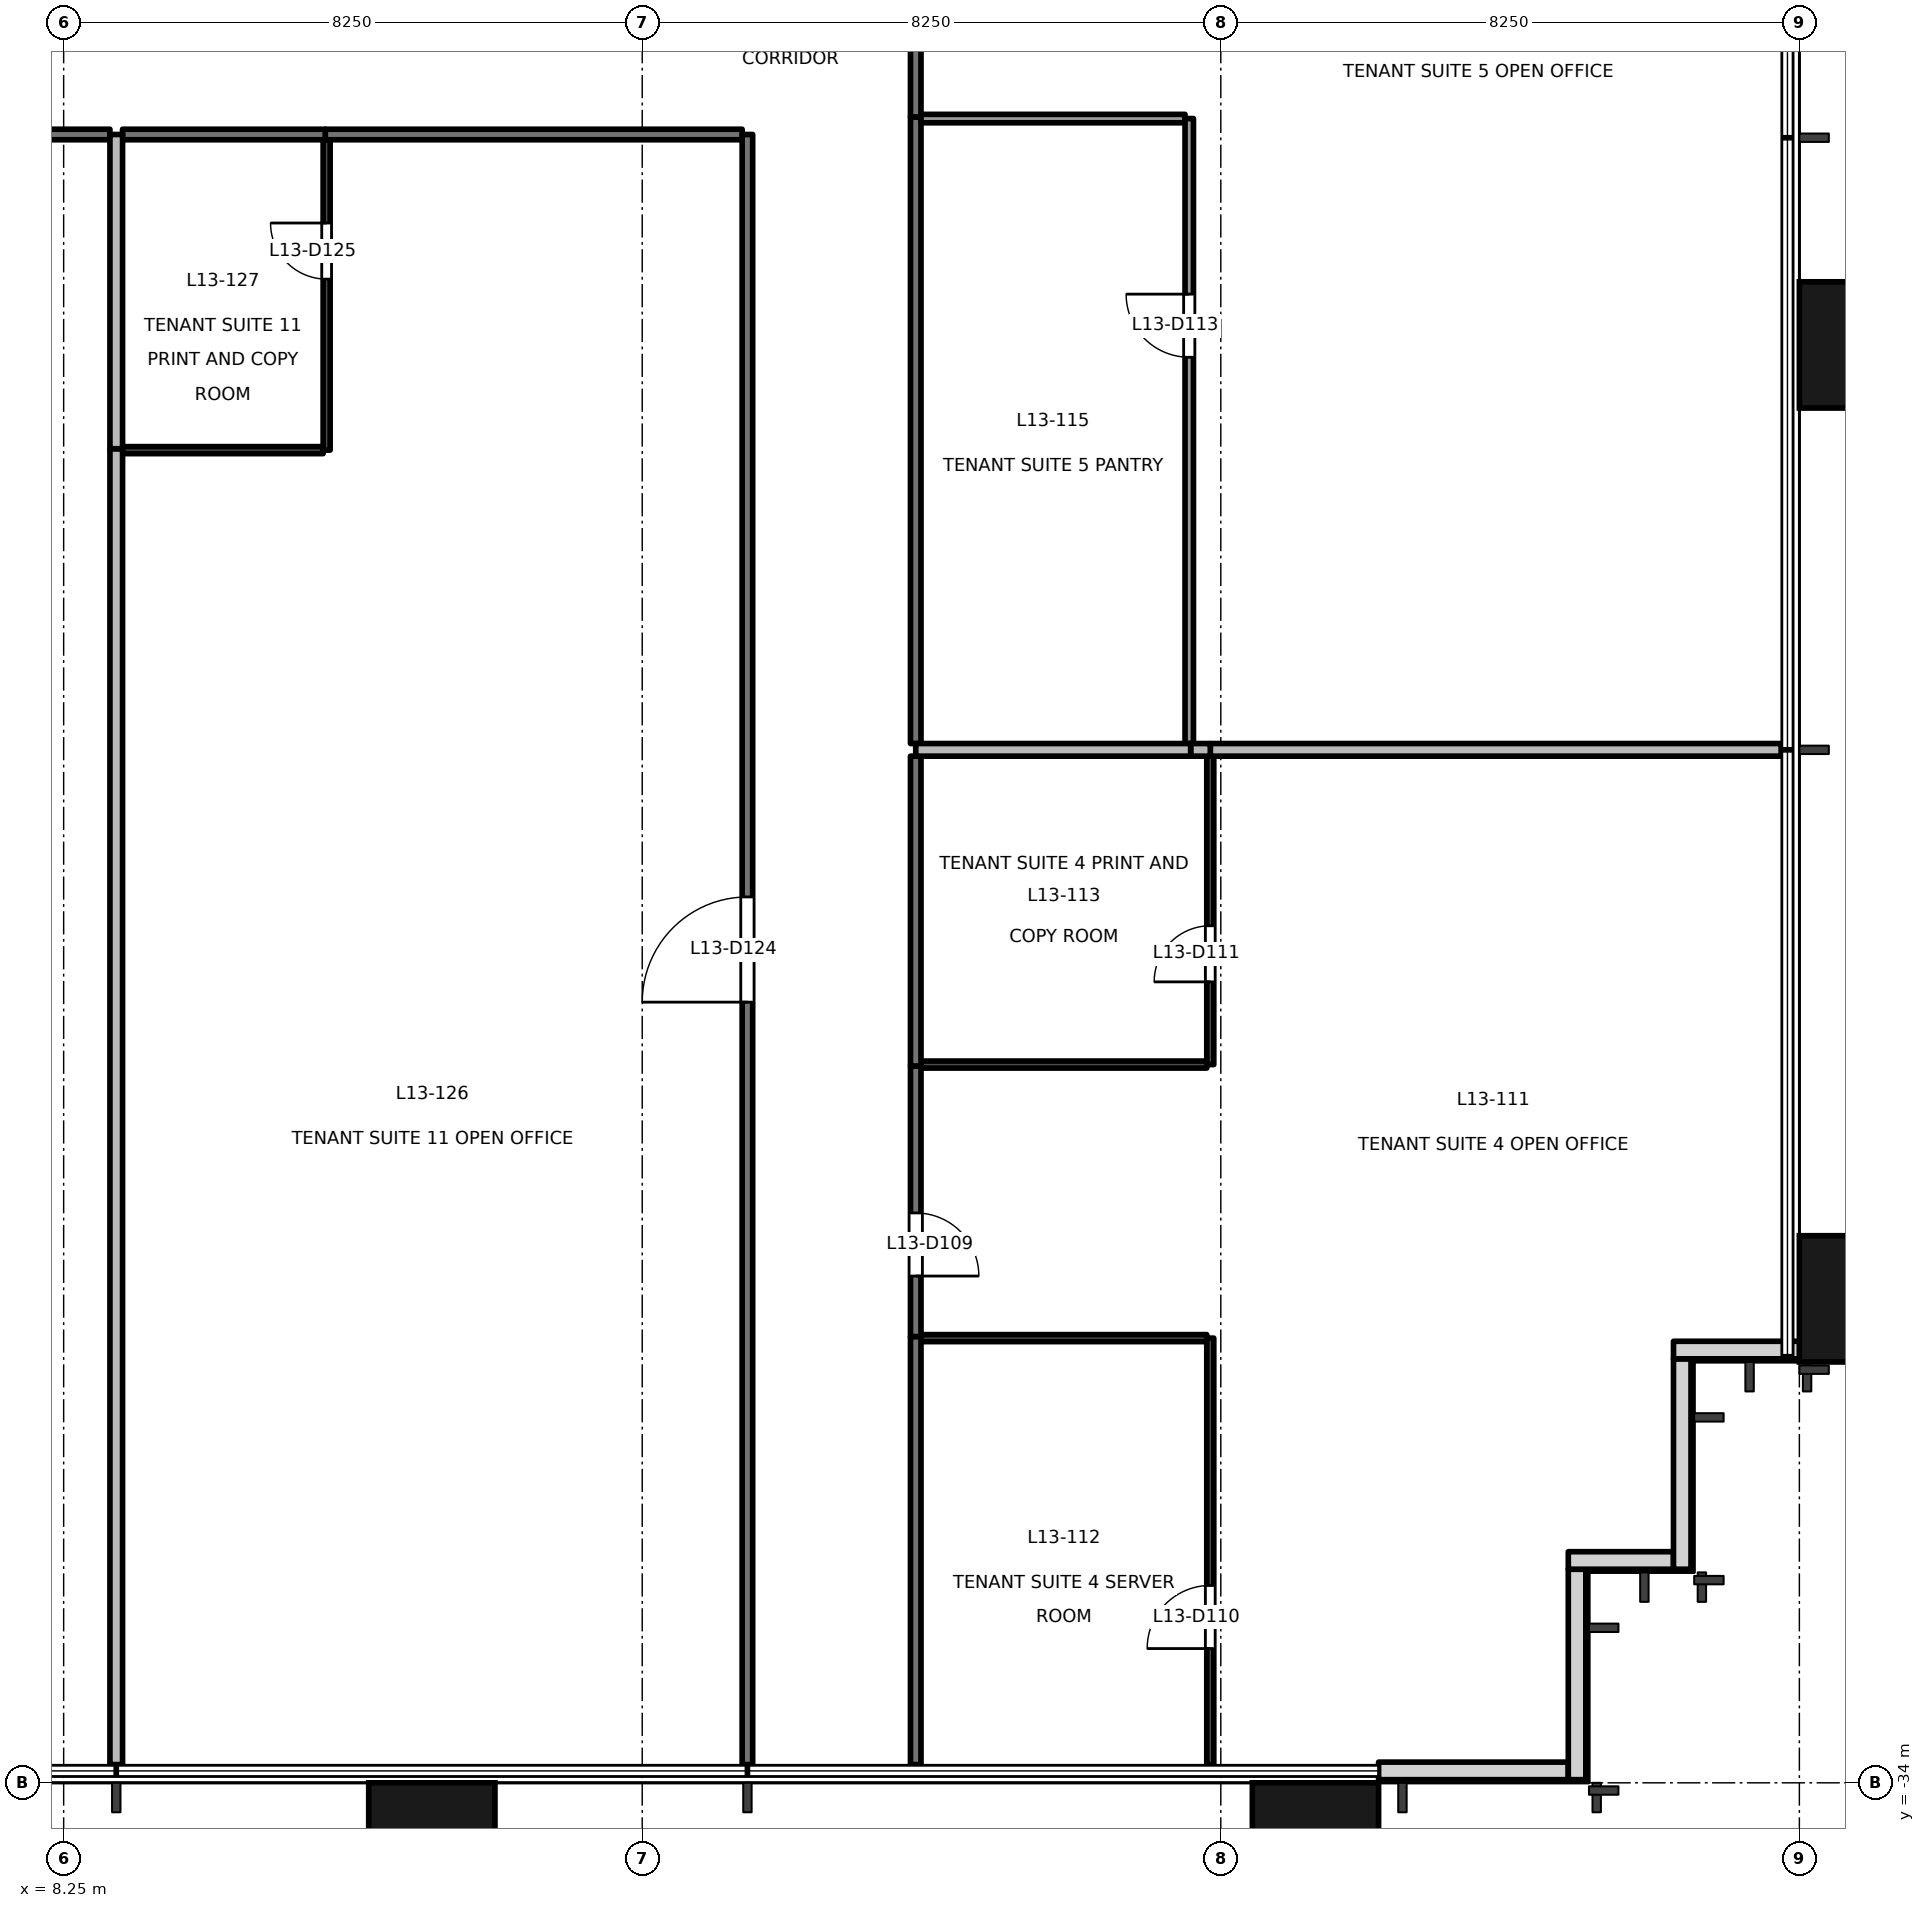
"""IFC4 building model, lengths in metres.
Left out: names, types, materials, properties, quantities, classifications, styles, units other than length and angle.
Written with IfcOpenShell. Run it as: python <this file> out.ifc"""

import sys

from ifc_helpers import new_model, si_unit, direction, frame, frame_2d, origin, origin_2d, place, context, subcontext, project, spatial, rectangle, extrude, element, fill, save


model = new_model("IFC4")
c1 = context("Model", 3, precision=1e-05, world=origin(), true_north=direction((0.0, 1.0)))
c2 = subcontext(c1, "Body", "Model", "MODEL_VIEW")
j1 = project(units=[si_unit("LENGTHUNIT", "METRE"), si_unit("PLANEANGLEUNIT", "RADIAN")], contexts=[c1])
p1 = place(None, origin())
s1 = spatial("IfcSite", under=j1, at=p1, CompositionType="ELEMENT")
p2 = place(p1, origin())
s2 = spatial("IfcBuilding", under=s1, at=p2, CompositionType="ELEMENT")
p3 = place(p2, frame((0.0, 0.0, 61.1)))
s3 = spatial("IfcBuildingStorey", under=s2, at=p3, CompositionType="ELEMENT", Elevation=61.1)
for number, where, z_axis, x_axis in (
    (1, (13.5, -34.9, -0.2), (0.0, 0.0, 1.0), (1.0, 0.0, 0.0)),
    (2, (26.1, -34.9, -0.2), (0.0, 0.0, 1.0), (1.0, 0.0, 0.0)),
    (3, (33.9, -27.1, -0.2), (0.0, 0.0, 1.0), (0.0, 1.0, 0.0)),
    (4, (33.9, -13.5, -0.2), (0.0, 0.0, 1.0), (0.0, 1.0, 0.0)),
):
    element("IfcColumn", number, at=place(p3, frame(where, z_axis=z_axis, x_axis=x_axis)), inside=s3, PredefinedType="COLUMN", context=c2, shape_type="SweptSolid", body=[
        extrude(rectangle(XDim=1.8, YDim=1.8, at=origin_2d()), origin(), (0.0, 0.0, 1.0), 4.1),
    ])
p4 = place(p3, frame((27.0, -33.83, 0.0), z_axis=(0.0, 0.0, 1.0), x_axis=(1.0, 0.0, 0.0)))
e5 = element("IfcWall", 5, at=p4, inside=s3, PredefinedType="SOLIDWALL", context=c2, shape_type="SweptSolid", body=[
    extrude(rectangle(XDim=2.705, YDim=0.25, at=frame_2d((1.353, 0.0))), origin(), (0.0, 0.0, 1.0), 3.9),
])
p5 = place(p3, frame((29.83, -33.955, 0.0), z_axis=(0.0, 0.0, 1.0), x_axis=(0.0, 1.0, 0.0)))
e6 = element("IfcWall", 6, at=p5, inside=s3, PredefinedType="SOLIDWALL", context=c2, shape_type="SweptSolid", body=[
    extrude(rectangle(XDim=3.0, YDim=0.25, at=frame_2d((1.5, 0.0))), origin(), (0.0, 0.0, 1.0), 3.9),
])
p6 = place(p3, frame((29.705, -30.83, 0.0), z_axis=(0.0, 0.0, 1.0), x_axis=(1.0, 0.0, 0.0)))
e7 = element("IfcWall", 7, at=p6, inside=s3, PredefinedType="SOLIDWALL", context=c2, shape_type="SweptSolid", body=[
    extrude(rectangle(XDim=1.5, YDim=0.25, at=frame_2d((0.75, 0.0))), origin(), (0.0, 0.0, 1.0), 3.9),
])
p7 = place(p3, frame((31.33, -30.955, 0.0), z_axis=(0.0, 0.0, 1.0), x_axis=(0.0, 1.0, 0.0)))
e8 = element("IfcWall", 8, at=p7, inside=s3, PredefinedType="SOLIDWALL", context=c2, shape_type="SweptSolid", body=[
    extrude(rectangle(XDim=3.0, YDim=0.25, at=frame_2d((1.5, 0.0))), origin(), (0.0, 0.0, 1.0), 3.9),
])
p8 = place(p3, frame((31.205, -27.83, 0.0), z_axis=(0.0, 0.0, 1.0), x_axis=(1.0, 0.0, 0.0)))
e9 = element("IfcWall", 9, at=p8, inside=s3, PredefinedType="SOLIDWALL", context=c2, shape_type="SweptSolid", body=[
    extrude(rectangle(XDim=1.8, YDim=0.25, at=frame_2d((0.9, 0.0))), origin(), (0.0, 0.0, 1.0), 3.9),
])
p9 = place(p3, frame((20.4, -23.78, 0.0), z_axis=(0.0, 0.0, 1.0), x_axis=(0.0, -1.0, 0.0)))
e10 = element("IfcWall", 10, at=p9, inside=s3, PredefinedType="PARTITIONING", context=c2, shape_type="SweptSolid", body=[
    extrude(rectangle(XDim=3.86, YDim=0.15, at=frame_2d((1.93, 0.0))), origin(), (0.0, 0.0, 1.0), 3.3),
])
p10 = place(p9, frame((2.095, 0.0, 0.0)))
e11 = element("IfcOpeningElement", 11, at=p10, cuts=e10, PredefinedType="OPENING", context=c2, shape_type="SweptSolid", body=[
    extrude(rectangle(XDim=0.9, YDim=2.1, at=frame_2d((0.45, 1.05))), frame((0.0, 0.085, 0.0), z_axis=(0.0, -1.0, 0.0), x_axis=(1.0, 0.0, 0.0)), (0.0, 0.0, 1.0), 0.171),
])
p11 = place(p3, frame((20.4, -27.64, 0.0), z_axis=(0.0, 0.0, 1.0), x_axis=(0.0, -1.0, 0.0)))
e12 = element("IfcWall", 12, at=p11, inside=s3, PredefinedType="PARTITIONING", context=c2, shape_type="SweptSolid", body=[
    extrude(rectangle(XDim=6.1, YDim=0.15, at=frame_2d((3.05, 0.0))), origin(), (0.0, 0.0, 1.0), 3.9),
])
p12 = place(p3, frame((20.4, -19.363, 0.0), z_axis=(0.0, 0.0, 1.0), x_axis=(0.0, -1.0, 0.0)))
e13 = element("IfcWall", 13, at=p12, inside=s3, PredefinedType="PARTITIONING", context=c2, shape_type="SweptSolid", body=[
    extrude(rectangle(XDim=4.417, YDim=0.15, at=frame_2d((2.208, 0.0))), origin(), (0.0, 0.0, 1.0), 3.3),
])
p13 = place(p3, frame((20.4, -4.817, 0.0), z_axis=(0.0, 0.0, 1.0), x_axis=(0.0, -1.0, 0.0)))
e14 = element("IfcWall", 14, at=p13, inside=s3, PredefinedType="PARTITIONING", context=c2, shape_type="SweptSolid", body=[
    extrude(rectangle(XDim=5.436, YDim=0.15, at=frame_2d((2.718, 0.0))), origin(), (0.0, 0.0, 1.0), 3.3),
])
p14 = place(p13, frame((1.109, 0.0, 0.0)))
e15 = element("IfcOpeningElement", 15, at=p14, cuts=e14, PredefinedType="OPENING", context=c2, shape_type="SweptSolid", body=[
    extrude(rectangle(XDim=1.5, YDim=2.1, at=frame_2d((0.75, 1.05))), frame((0.0, 0.085, 0.0), z_axis=(0.0, -1.0, 0.0), x_axis=(1.0, 0.0, 0.0)), (0.0, 0.0, 1.0), 0.171),
])
p15 = place(p3, frame((20.4, -10.253, 0.0), z_axis=(0.0, 0.0, 1.0), x_axis=(0.0, -1.0, 0.0)))
e16 = element("IfcWall", 16, at=p15, inside=s3, PredefinedType="PARTITIONING", context=c2, shape_type="SweptSolid", body=[
    extrude(rectangle(XDim=8.93, YDim=0.15, at=frame_2d((4.465, 0.0))), origin(), (0.0, 0.0, 1.0), 3.3),
])
p16 = place(p3, frame((8.91, -10.5, 0.0), z_axis=(0.0, 0.0, 1.0), x_axis=(-1.0, 0.0, 0.0)))
e17 = element("IfcWall", 17, at=p16, inside=s3, PredefinedType="PARTITIONING", context=c2, shape_type="SweptSolid", body=[
    extrude(rectangle(XDim=5.93, YDim=0.15, at=frame_2d((2.965, 0.0))), origin(), (0.0, 0.0, 1.0), 2.9),
])
p17 = place(p16, frame((1.232, 0.0, 0.0)))
e18 = element("IfcOpeningElement", 18, at=p17, cuts=e17, PredefinedType="OPENING", context=c2, shape_type="SweptSolid", body=[
    extrude(rectangle(XDim=1.5, YDim=2.1, at=frame_2d((0.75, 1.05))), frame((0.0, 0.085, 0.0), z_axis=(0.0, -1.0, 0.0), x_axis=(1.0, 0.0, 0.0)), (0.0, 0.0, 1.0), 0.171),
])
p18 = place(p3, frame((17.925, -10.5, 0.0), z_axis=(0.0, 0.0, 1.0), x_axis=(-1.0, 0.0, 0.0)))
e19 = element("IfcWall", 19, at=p18, inside=s3, PredefinedType="PARTITIONING", context=c2, shape_type="SweptSolid", body=[
    extrude(rectangle(XDim=5.945, YDim=0.15, at=frame_2d((2.973, 0.0))), origin(), (0.0, 0.0, 1.0), 2.5),
])
p19 = place(p3, frame((18.0, -33.74, 0.0), z_axis=(0.0, 0.0, 1.0), x_axis=(0.0, 1.0, 0.0)))
e20 = element("IfcWall", 20, at=p19, inside=s3, PredefinedType="PARTITIONING", context=c2, shape_type="SweptSolid", body=[
    extrude(rectangle(XDim=23.24, YDim=0.15, at=frame_2d((11.62, 0.0))), origin(), (0.0, 0.0, 1.0), 2.5),
])
p20 = place(p19, frame((10.87, 0.0, 0.0)))
e21 = element("IfcOpeningElement", 21, at=p20, cuts=e20, PredefinedType="OPENING", context=c2, shape_type="SweptSolid", body=[
    extrude(rectangle(XDim=1.5, YDim=2.1, at=frame_2d((0.75, 1.05))), frame((0.0, 0.085, 0.0), z_axis=(0.0, -1.0, 0.0), x_axis=(1.0, 0.0, 0.0)), (0.0, 0.0, 1.0), 0.171),
])
p21 = place(p3, frame((11.98, -10.5, 0.0), z_axis=(0.0, 0.0, 1.0), x_axis=(-1.0, 0.0, 0.0)))
e22 = element("IfcWall", 22, at=p21, inside=s3, PredefinedType="PARTITIONING", context=c2, shape_type="SweptSolid", body=[
    extrude(rectangle(XDim=2.89, YDim=0.15, at=frame_2d((1.445, 0.0))), origin(), (0.0, 0.0, 1.0), 2.9),
])
p22 = place(p3, frame((24.55, -27.66, 0.0), z_axis=(0.0, 0.0, 1.0), x_axis=(-1.0, 0.0, 0.0)))
e23 = element("IfcWall", 23, at=p22, inside=s3, PredefinedType="PARTITIONING", context=c2, shape_type="SweptSolid", body=[
    extrude(rectangle(XDim=4.075, YDim=0.1, at=frame_2d((2.038, 0.0))), origin(), (0.0, 0.0, 1.0), 3.9),
])
p23 = place(p3, frame((24.6, -33.74, 0.0), z_axis=(0.0, 0.0, 1.0), x_axis=(0.0, 1.0, 0.0)))
e24 = element("IfcWall", 24, at=p23, inside=s3, PredefinedType="PARTITIONING", context=c2, shape_type="SweptSolid", body=[
    extrude(rectangle(XDim=6.08, YDim=0.1, at=frame_2d((3.04, 0.0))), origin(), (0.0, 0.0, 1.0), 3.9),
])
p24 = place(p23, frame((1.654, 0.0, 0.0)))
e25 = element("IfcOpeningElement", 25, at=p24, cuts=e24, PredefinedType="OPENING", context=c2, shape_type="SweptSolid", body=[
    extrude(rectangle(XDim=0.9, YDim=2.1, at=frame_2d((0.45, 1.05))), frame((0.0, 0.061, 0.0), z_axis=(0.0, -1.0, 0.0), x_axis=(1.0, 0.0, 0.0)), (0.0, 0.0, 1.0), 0.121),
])
p25 = place(p3, frame((20.475, -23.76, 0.0), z_axis=(0.0, 0.0, 1.0), x_axis=(1.0, 0.0, 0.0)))
e26 = element("IfcWall", 26, at=p25, inside=s3, PredefinedType="PARTITIONING", context=c2, shape_type="SweptSolid", body=[
    extrude(rectangle(XDim=4.075, YDim=0.1, at=frame_2d((2.038, 0.0))), origin(), (0.0, 0.0, 1.0), 3.9),
])
p26 = place(p3, frame((24.6, -23.76, 0.0), z_axis=(0.0, 0.0, 1.0), x_axis=(0.0, 1.0, 0.0)))
e27 = element("IfcWall", 27, at=p26, inside=s3, PredefinedType="PARTITIONING", context=c2, shape_type="SweptSolid", body=[
    extrude(rectangle(XDim=4.397, YDim=0.1, at=frame_2d((2.198, 0.0))), origin(), (0.0, 0.0, 1.0), 3.3),
])
p27 = place(p26, frame((1.179, 0.0, 0.0)))
e28 = element("IfcOpeningElement", 28, at=p27, cuts=e27, PredefinedType="OPENING", context=c2, shape_type="SweptSolid", body=[
    extrude(rectangle(XDim=0.8, YDim=2.1, at=frame_2d((0.4, 1.05))), frame((0.0, 0.061, 0.0), z_axis=(0.0, -1.0, 0.0), x_axis=(1.0, 0.0, 0.0)), (0.0, 0.0, 1.0), 0.121),
])
p28 = place(p3, frame((24.6, -19.273, 0.0), z_axis=(0.0, 0.0, 1.0), x_axis=(1.0, 0.0, 0.0)))
e29 = element("IfcWall", 29, at=p28, inside=s3, PredefinedType="PARTITIONING", context=c2, shape_type="SweptSolid", body=[
    extrude(rectangle(XDim=8.14, YDim=0.18, at=frame_2d((4.07, 0.0))), origin(), (0.0, 0.0, 1.0), 3.9),
])
p29 = place(p3, frame((24.32, -19.273, 0.0), z_axis=(0.0, 0.0, 1.0), x_axis=(1.0, 0.0, 0.0)))
e30 = element("IfcWall", 30, at=p29, inside=s3, PredefinedType="PARTITIONING", context=c2, shape_type="SweptSolid", body=[
    extrude(rectangle(XDim=0.28, YDim=0.18, at=frame_2d((0.14, 0.0))), origin(), (0.0, 0.0, 1.0), 3.9),
])
p30 = place(p3, frame((20.4, -19.273, 0.0), z_axis=(0.0, 0.0, 1.0), x_axis=(1.0, 0.0, 0.0)))
e31 = element("IfcWall", 31, at=p30, inside=s3, PredefinedType="PARTITIONING", context=c2, shape_type="SweptSolid", body=[
    extrude(rectangle(XDim=3.92, YDim=0.18, at=frame_2d((1.96, 0.0))), origin(), (0.0, 0.0, 1.0), 3.9),
])
p31 = place(p3, frame((24.24, -10.273, 0.0), z_axis=(0.0, 0.0, 1.0), x_axis=(-1.0, 0.0, 0.0)))
e32 = element("IfcWall", 32, at=p31, inside=s3, PredefinedType="PARTITIONING", context=c2, shape_type="SweptSolid", body=[
    extrude(rectangle(XDim=3.765, YDim=0.12, at=frame_2d((1.882, 0.0))), origin(), (0.0, 0.0, 1.0), 3.9),
])
p32 = place(p3, frame((24.3, -19.183, 0.0), z_axis=(0.0, 0.0, 1.0), x_axis=(0.0, 1.0, 0.0)))
e33 = element("IfcWall", 33, at=p32, inside=s3, PredefinedType="PARTITIONING", context=c2, shape_type="SweptSolid", body=[
    extrude(rectangle(XDim=8.91, YDim=0.12, at=frame_2d((4.455, 0.0))), origin(), (0.0, 0.0, 1.0), 3.3),
])
p33 = place(p32, frame((5.507, 0.0, 0.0)))
e34 = element("IfcOpeningElement", 34, at=p33, cuts=e33, PredefinedType="OPENING", context=c2, shape_type="SweptSolid", body=[
    extrude(rectangle(XDim=0.9, YDim=2.1, at=frame_2d((0.45, 1.05))), frame((0.0, 0.071, 0.0), z_axis=(0.0, -1.0, 0.0), x_axis=(1.0, 0.0, 0.0)), (0.0, 0.0, 1.0), 0.141),
])
p34 = place(p3, frame((9.0, -14.98, 0.0), z_axis=(0.0, 0.0, 1.0), x_axis=(0.0, -1.0, 0.0)))
e35 = element("IfcWall", 35, at=p34, inside=s3, PredefinedType="PARTITIONING", context=c2, shape_type="SweptSolid", body=[
    extrude(rectangle(XDim=18.76, YDim=0.18, at=frame_2d((9.38, 0.0))), origin(), (0.0, 0.0, 1.0), 2.9),
])
p35 = place(p3, frame((9.0, -10.5, 0.0), z_axis=(0.0, 0.0, 1.0), x_axis=(0.0, -1.0, 0.0)))
e36 = element("IfcWall", 36, at=p35, inside=s3, PredefinedType="PARTITIONING", context=c2, shape_type="SweptSolid", body=[
    extrude(rectangle(XDim=4.48, YDim=0.18, at=frame_2d((2.24, 0.0))), origin(), (0.0, 0.0, 1.0), 2.9),
])
p36 = place(p3, frame((9.09, -15.0, 0.0), z_axis=(0.0, 0.0, 1.0), x_axis=(1.0, 0.0, 0.0)))
e37 = element("IfcWall", 37, at=p36, inside=s3, PredefinedType="PARTITIONING", context=c2, shape_type="SweptSolid", body=[
    extrude(rectangle(XDim=2.86, YDim=0.1, at=frame_2d((1.43, 0.0))), origin(), (0.0, 0.0, 1.0), 2.9),
])
p37 = place(p3, frame((12.0, -15.0, 0.0), z_axis=(0.0, 0.0, 1.0), x_axis=(0.0, 1.0, 0.0)))
e38 = element("IfcWall", 38, at=p37, inside=s3, PredefinedType="PARTITIONING", context=c2, shape_type="SweptSolid", body=[
    extrude(rectangle(XDim=4.425, YDim=0.1, at=frame_2d((2.212, 0.0))), origin(), (0.0, 0.0, 1.0), 3.9),
])
p38 = place(p37, frame((2.438, 0.0, 0.0)))
e39 = element("IfcOpeningElement", 39, at=p38, cuts=e38, PredefinedType="OPENING", context=c2, shape_type="SweptSolid", body=[
    extrude(rectangle(XDim=0.8, YDim=2.1, at=frame_2d((0.4, 1.05))), frame((0.0, 0.061, 0.0), z_axis=(0.0, -1.0, 0.0), x_axis=(1.0, 0.0, 0.0)), (0.0, 0.0, 1.0), 0.121),
])
p39 = place(p10, origin())
e40 = element("IfcDoor", 40, at=p39, inside=s3, OperationType="SINGLE_SWING_RIGHT", PredefinedType="DOOR", context=c2, shape_type="SweptSolid", body=[
    extrude(rectangle(XDim=0.9, YDim=2.1, at=frame_2d((0.45, 1.05))), frame((0.0, 0.025, 0.0), z_axis=(0.0, -1.0, 0.0), x_axis=(1.0, 0.0, 0.0)), (0.0, 0.0, 1.0), 0.05),
])
fill(e11, e40)
p40 = place(p24, origin())
e41 = element("IfcDoor", 41, at=p40, inside=s3, OperationType="SINGLE_SWING_LEFT", PredefinedType="DOOR", context=c2, shape_type="SweptSolid", body=[
    extrude(rectangle(XDim=0.9, YDim=2.1, at=frame_2d((0.45, 1.05))), frame((0.0, 0.025, 0.0), z_axis=(0.0, -1.0, 0.0), x_axis=(1.0, 0.0, 0.0)), (0.0, 0.0, 1.0), 0.05),
])
fill(e25, e41)
p41 = place(p27, origin())
e42 = element("IfcDoor", 42, at=p41, inside=s3, OperationType="SINGLE_SWING_LEFT", PredefinedType="DOOR", context=c2, shape_type="SweptSolid", body=[
    extrude(rectangle(XDim=0.8, YDim=2.1, at=frame_2d((0.4, 1.05))), frame((0.0, 0.025, 0.0), z_axis=(0.0, -1.0, 0.0), x_axis=(1.0, 0.0, 0.0)), (0.0, 0.0, 1.0), 0.05),
])
fill(e28, e42)
p42 = place(p33, origin())
e43 = element("IfcDoor", 43, at=p42, inside=s3, OperationType="SINGLE_SWING_RIGHT", PredefinedType="DOOR", context=c2, shape_type="SweptSolid", body=[
    extrude(rectangle(XDim=0.9, YDim=2.1, at=frame_2d((0.45, 1.05))), frame((0.0, 0.025, 0.0), z_axis=(0.0, -1.0, 0.0), x_axis=(1.0, 0.0, 0.0)), (0.0, 0.0, 1.0), 0.05),
])
fill(e34, e43)
p43 = place(p20, origin())
e44 = element("IfcDoor", 44, at=p43, inside=s3, OperationType="DOUBLE_DOOR_SINGLE_SWING", PredefinedType="DOOR", context=c2, shape_type="SweptSolid", body=[
    extrude(rectangle(XDim=1.5, YDim=2.1, at=frame_2d((0.75, 1.05))), frame((0.0, 0.025, 0.0), z_axis=(0.0, -1.0, 0.0), x_axis=(1.0, 0.0, 0.0)), (0.0, 0.0, 1.0), 0.05),
])
fill(e21, e44)
p44 = place(p38, origin())
e45 = element("IfcDoor", 45, at=p44, inside=s3, OperationType="SINGLE_SWING_RIGHT", PredefinedType="DOOR", context=c2, shape_type="SweptSolid", body=[
    extrude(rectangle(XDim=0.8, YDim=2.1, at=frame_2d((0.4, 1.05))), frame((0.0, 0.025, 0.0), z_axis=(0.0, -1.0, 0.0), x_axis=(1.0, 0.0, 0.0)), (0.0, 0.0, 1.0), 0.05),
])
fill(e39, e45)
save(model, sys.argv[1])
